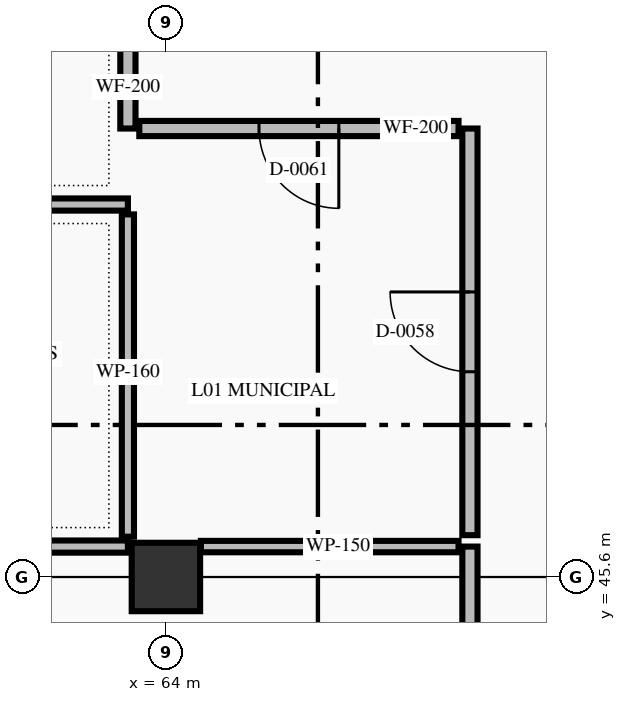
"""IFC4 building model, lengths in metres.
Left out: names, types, materials, properties, quantities, classifications, styles, units other than length and angle.
Written with IfcOpenShell. Run it as: python <this file> out.ifc"""

import sys

from ifc_helpers import new_model, si_unit, direction, frame, frame_2d, origin, origin_2d, place, context, subcontext, project, spatial, rectangle, extrude, element, fill, save


model = new_model("IFC4")
c1 = context("Model", 3, precision=1e-05, world=origin(), true_north=direction((0.0, 1.0)))
c2 = subcontext(c1, "Body", "Model", "MODEL_VIEW")
j1 = project(units=[si_unit("LENGTHUNIT", "METRE"), si_unit("PLANEANGLEUNIT", "RADIAN")], contexts=[c1])
p1 = place(None, origin())
s1 = spatial("IfcSite", under=j1, at=p1, CompositionType="ELEMENT")
p2 = place(p1, origin())
s2 = spatial("IfcBuilding", under=s1, at=p2, CompositionType="ELEMENT")
p3 = place(p2, origin())
s3 = spatial("IfcBuildingStorey", under=s2, at=p3, CompositionType="ELEMENT", Elevation=0.0)
p4 = place(p3, frame((64.0, 45.6, 0.0), z_axis=(0.0, 0.0, 1.0), x_axis=(1.0, 0.0, 0.0)))
e1 = element("IfcColumn", 1, at=p4, inside=s3, PredefinedType="COLUMN", context=c2, shape_type="SweptSolid", body=[
    extrude(rectangle(XDim=0.9, YDim=0.9, at=origin_2d()), origin(), (0.0, 0.0, 1.0), 5.4),
])
p5 = place(p3, frame((56.0, 50.5, 0.0), z_axis=(0.0, 0.0, 1.0), x_axis=(1.0, 0.0, 0.0)))
e2 = element("IfcWall", 2, at=p5, inside=s3, PredefinedType="PARTITIONING", context=c2, shape_type="SweptSolid", body=[
    extrude(rectangle(XDim=7.5, YDim=0.16, at=frame_2d((3.75, 0.0))), origin(), (0.0, 0.0, 1.0), 5.16),
])
p6 = place(p3, frame((63.5, 46.0, 0.0), z_axis=(0.0, 0.0, 1.0), x_axis=(-1.0, 0.0, 0.0)))
e3 = element("IfcWall", 3, at=p6, inside=s3, PredefinedType="PARTITIONING", context=c2, shape_type="SweptSolid", body=[
    extrude(rectangle(XDim=7.065, YDim=0.16, at=frame_2d((3.532, 0.0))), origin(), (0.0, 0.0, 1.0), 5.16),
])
p7 = place(p3, frame((63.5, 50.37, 0.0), z_axis=(0.0, 0.0, 1.0), x_axis=(0.0, -1.0, 0.0)))
e4 = element("IfcWall", 4, at=p7, inside=s3, PredefinedType="PARTITIONING", context=c2, shape_type="SweptSolid", body=[
    extrude(rectangle(XDim=4.24, YDim=0.16, at=frame_2d((2.12, 0.0))), origin(), (0.0, 0.0, 1.0), 5.16),
])
p8 = place(p3, frame((63.5, 54.87, 0.0), z_axis=(0.0, 0.0, 1.0), x_axis=(0.0, -1.0, 0.0)))
e5 = element("IfcWall", 5, at=p8, inside=s3, PredefinedType="STANDARD", context=c2, shape_type="SweptSolid", body=[
    extrude(rectangle(XDim=3.37, YDim=0.2, at=frame_2d((1.685, 0.0))), origin(), (0.0, 0.0, 1.0), 5.16),
])
p9 = place(p3, frame((68.0, 46.0, 0.0), z_axis=(0.0, 0.0, 1.0), x_axis=(0.0, -1.0, 0.0)))
e6 = element("IfcWall", 6, at=p9, inside=s3, PredefinedType="STANDARD", context=c2, shape_type="SweptSolid", body=[
    extrude(rectangle(XDim=7.81, YDim=0.2, at=frame_2d((3.905, 0.0))), origin(), (0.0, 0.0, 1.0), 4.66),
])
p10 = place(p9, frame((2.955, 0.0, 0.0)))
e7 = element("IfcOpeningElement", 7, at=p10, cuts=e6, PredefinedType="OPENING", context=c2, shape_type="SweptSolid", body=[
    extrude(rectangle(XDim=1.9, YDim=2.4, at=frame_2d((0.95, 1.2))), frame((0.0, 0.11, 0.0), z_axis=(0.0, -1.0, 0.0), x_axis=(1.0, 0.0, 0.0)), (0.0, 0.0, 1.0), 0.22),
])
p11 = place(p3, frame((64.46, 46.0, 0.0), z_axis=(0.0, 0.0, 1.0), x_axis=(1.0, 0.0, 0.0)))
e8 = element("IfcWall", 8, at=p11, inside=s3, PredefinedType="PARTITIONING", context=c2, shape_type="SweptSolid", body=[
    extrude(rectangle(XDim=3.39, YDim=0.15, at=frame_2d((1.695, 0.0))), origin(), (0.0, 0.0, 1.0), 5.16),
])
p12 = place(p3, frame((68.0, 46.15, 0.0), z_axis=(0.0, 0.0, 1.0), x_axis=(0.0, 1.0, 0.0)))
e9 = element("IfcWall", 9, at=p12, inside=s3, PredefinedType="STANDARD", context=c2, shape_type="SweptSolid", body=[
    extrude(rectangle(XDim=5.35, YDim=0.2, at=frame_2d((2.675, 0.0))), origin(), (0.0, 0.0, 1.0), 4.66),
])
p13 = place(p12, frame((2.15, 0.0, 0.0)))
e10 = element("IfcOpeningElement", 10, at=p13, cuts=e9, PredefinedType="OPENING", context=c2, shape_type="SweptSolid", body=[
    extrude(rectangle(XDim=1.05, YDim=2.15, at=frame_2d((0.525, 1.075))), frame((0.0, 0.11, 0.0), z_axis=(0.0, -1.0, 0.0), x_axis=(1.0, 0.0, 0.0)), (0.0, 0.0, 1.0), 0.22),
])
p14 = place(p3, frame((67.85, 51.5, 0.0), z_axis=(0.0, 0.0, 1.0), x_axis=(-1.0, 0.0, 0.0)))
e11 = element("IfcWall", 11, at=p14, inside=s3, PredefinedType="STANDARD", context=c2, shape_type="SweptSolid", body=[
    extrude(rectangle(XDim=4.2, YDim=0.2, at=frame_2d((2.1, 0.0))), origin(), (0.0, 0.0, 1.0), 5.16),
])
p15 = place(p14, frame((1.575, 0.0, 0.0)))
e12 = element("IfcOpeningElement", 12, at=p15, cuts=e11, PredefinedType="OPENING", context=c2, shape_type="SweptSolid", body=[
    extrude(rectangle(XDim=1.05, YDim=2.15, at=frame_2d((0.525, 1.075))), frame((0.0, 0.11, 0.0), z_axis=(0.0, -1.0, 0.0), x_axis=(1.0, 0.0, 0.0)), (0.0, 0.0, 1.0), 0.22),
])
p16 = place(p13, origin())
e13 = element("IfcDoor", 13, at=p16, inside=s3, OperationType="SINGLE_SWING_RIGHT", PredefinedType="DOOR", context=c2, shape_type="SweptSolid", body=[
    extrude(rectangle(XDim=1.05, YDim=2.15, at=frame_2d((0.525, 1.075))), frame((0.0, 0.025, 0.0), z_axis=(0.0, -1.0, 0.0), x_axis=(1.0, 0.0, 0.0)), (0.0, 0.0, 1.0), 0.05),
])
fill(e10, e13)
p17 = place(p15, origin())
e14 = element("IfcDoor", 14, at=p17, inside=s3, OperationType="SINGLE_SWING_LEFT", PredefinedType="DOOR", context=c2, shape_type="SweptSolid", body=[
    extrude(rectangle(XDim=1.05, YDim=2.15, at=frame_2d((0.525, 1.075))), frame((0.0, 0.025, 0.0), z_axis=(0.0, -1.0, 0.0), x_axis=(1.0, 0.0, 0.0)), (0.0, 0.0, 1.0), 0.05),
])
fill(e12, e14)
save(model, sys.argv[1])
